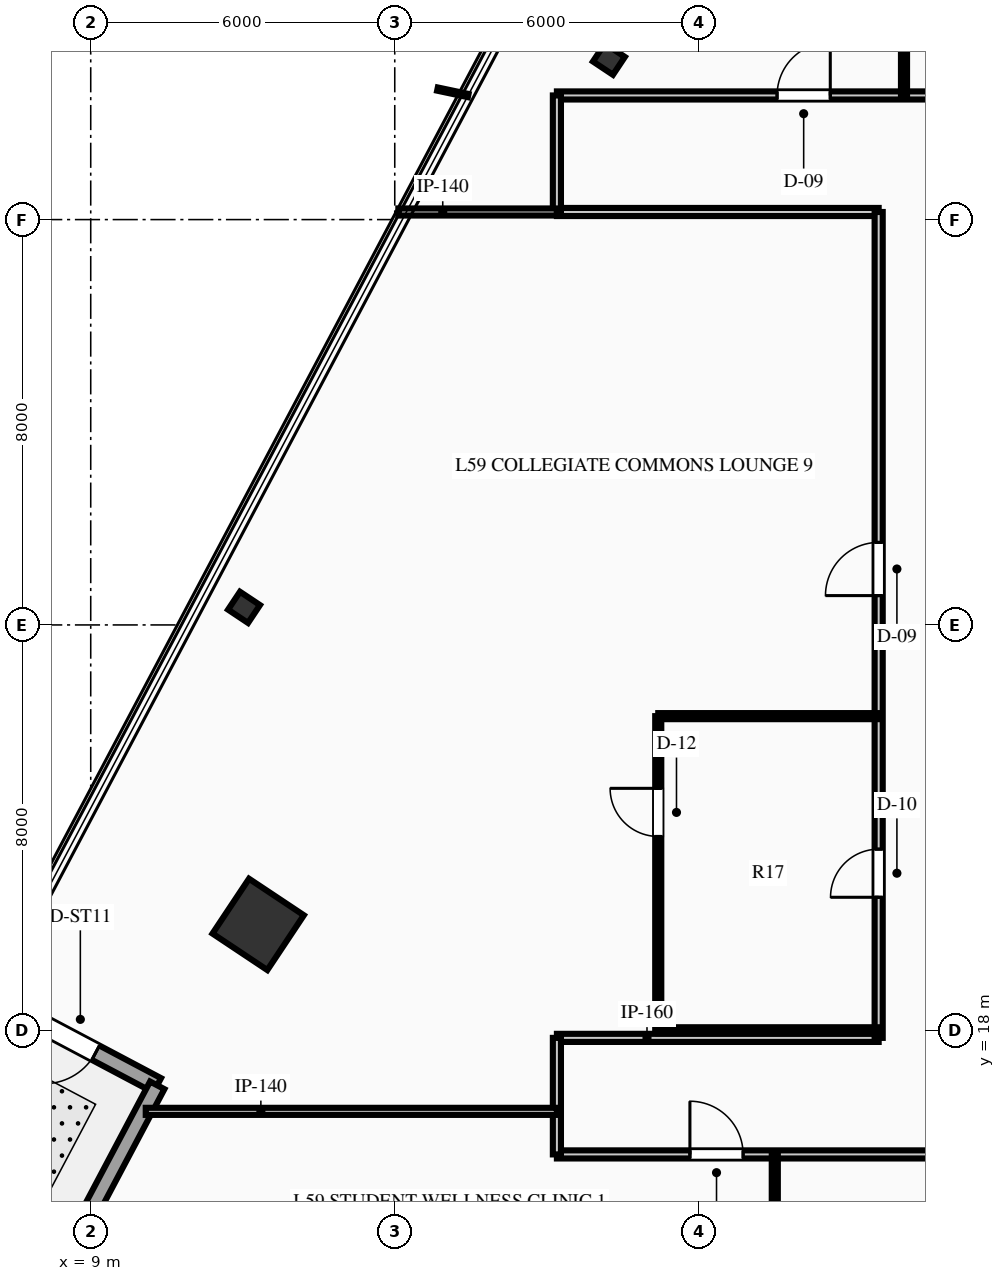
"""IFC4 building model, lengths in metres.
Left out: names, types, materials, properties, quantities, classifications, styles, units other than length and angle.
Written with IfcOpenShell. Run it as: python <this file> out.ifc"""

import sys

from ifc_helpers import new_model, si_unit, direction, frame, frame_2d, origin, origin_2d, place, context, subcontext, project, spatial, rectangle, hollow_rectangle, i_section, extrude, element, fill, save


model = new_model("IFC4")
c1 = context("Model", 3, precision=1e-05, world=origin(), true_north=direction((0.0, 1.0)))
c2 = subcontext(c1, "Body", "Model", "MODEL_VIEW")
j1 = project(units=[si_unit("LENGTHUNIT", "METRE"), si_unit("PLANEANGLEUNIT", "RADIAN")], contexts=[c1])
p1 = place(None, origin())
s1 = spatial("IfcSite", under=j1, at=p1, CompositionType="ELEMENT")
p2 = place(p1, origin())
s2 = spatial("IfcBuilding", under=s1, at=p2, CompositionType="ELEMENT")
p3 = place(p2, frame((0.0, 0.0, 235.95)))
s3 = spatial("IfcBuildingStorey", under=s2, at=p3, CompositionType="ELEMENT", Elevation=235.95)
p4 = place(p3, frame((12.305, 20.09, 0.0), z_axis=(0.0, 0.0, 1.0), x_axis=(0.554118199338, 0.832437998389, 0.0)))
e1 = element("IfcColumn", 1, at=p4, inside=s3, PredefinedType="COLUMN", context=c2, shape_type="SweptSolid", body=[
    extrude(hollow_rectangle(XDim=1.3, YDim=1.3, WallThickness=0.06, at=origin_2d()), origin(), (0.0, 0.0, 1.0), 3.75),
])
for number, where, z_axis, x_axis in (
    (2, (19.226, 37.166, 0.0), (0.0, 0.0, 1.0), (0.554, 0.832, 0.0)),
    (3, (12.025, 26.347, 0.0), (0.0, 0.0, 1.0), (0.554, 0.832, 0.0)),
    (4, (14.088, 14.458, 0.0), (0.0, 0.0, 1.0), (0.554, 0.832, 0.0)),
):
    element("IfcColumn", number, at=place(p3, frame(where, z_axis=z_axis, x_axis=x_axis)), inside=s3, PredefinedType="COLUMN", context=c2, shape_type="SweptSolid", body=[
        extrude(i_section(OverallWidth=0.424, OverallDepth=0.474, WebThickness=0.048, FlangeThickness=0.077, at=origin_2d()), origin(), (0.0, 0.0, 1.0), 3.75),
    ])
p5 = place(p3, frame((10.312, 16.914, 0.0), z_axis=(0.0, 0.0, 1.0), x_axis=(-0.883768120839, 0.467925110021, 0.0)))
e5 = element("IfcWall", 5, at=p5, inside=s3, PredefinedType="STANDARD", context=c2, shape_type="SweptSolid", body=[
    extrude(rectangle(XDim=3.9, YDim=0.32, at=frame_2d((1.95, 0.0))), origin(), (0.0, 0.0, 1.0), 3.4),
])
p6 = place(p5, frame((1.375, 0.0, 0.0)))
e6 = element("IfcOpeningElement", 6, at=p6, cuts=e5, PredefinedType="OPENING", context=c2, shape_type="SweptSolid", body=[
    extrude(rectangle(XDim=1.15, YDim=2.2, at=frame_2d((0.575, 1.1))), frame((0.0, 0.17, 0.0), z_axis=(0.0, -1.0, 0.0), x_axis=(1.0, 0.0, 0.0)), (0.0, 0.0, 1.0), 0.34),
])
p7 = place(p3, frame((8.488, 13.467, 0.0), z_axis=(0.0, 0.0, 1.0), x_axis=(0.467925110021, 0.883768120839, 0.0)))
e7 = element("IfcWall", 7, at=p7, inside=s3, PredefinedType="STANDARD", context=c2, shape_type="SweptSolid", body=[
    extrude(rectangle(XDim=3.9, YDim=0.32, at=frame_2d((1.95, 0.0))), origin(), (0.0, 0.0, 1.0), 3.4),
])
p8 = place(p3, frame((18.2, 15.55, 0.0), z_axis=(0.0, 0.0, 1.0), x_axis=(1.0, 0.0, 0.0)))
e8 = element("IfcWall", 8, at=p8, inside=s3, PredefinedType="PARTITIONING", context=c2, shape_type="SweptSolid", body=[
    extrude(rectangle(XDim=35.6, YDim=0.16, at=frame_2d((17.8, 0.0))), origin(), (0.0, 0.0, 1.0), 2.938),
])
p9 = place(p8, frame((2.625, 0.0, 0.0)))
e9 = element("IfcOpeningElement", 9, at=p9, cuts=e8, PredefinedType="OPENING", context=c2, shape_type="SweptSolid", body=[
    extrude(rectangle(XDim=1.05, YDim=2.15, at=frame_2d((0.525, 1.075))), frame((0.0, 0.09, 0.0), z_axis=(0.0, -1.0, 0.0), x_axis=(1.0, 0.0, 0.0)), (0.0, 0.0, 1.0), 0.18),
])
p10 = place(p8, frame((9.335, 0.0, 0.0)))
e10 = element("IfcOpeningElement", 10, at=p10, cuts=e8, PredefinedType="OPENING", context=c2, shape_type="SweptSolid", body=[
    extrude(rectangle(XDim=1.05, YDim=2.15, at=frame_2d((0.525, 1.075))), frame((0.0, 0.09, 0.0), z_axis=(0.0, -1.0, 0.0), x_axis=(1.0, 0.0, 0.0)), (0.0, 0.0, 1.0), 0.18),
])
p11 = place(p8, frame((17.775, 0.0, 0.0)))
e11 = element("IfcOpeningElement", 11, at=p11, cuts=e8, PredefinedType="OPENING", context=c2, shape_type="SweptSolid", body=[
    extrude(rectangle(XDim=1.05, YDim=2.15, at=frame_2d((0.525, 1.075))), frame((0.0, 0.09, 0.0), z_axis=(0.0, -1.0, 0.0), x_axis=(1.0, 0.0, 0.0)), (0.0, 0.0, 1.0), 0.18),
])
p12 = place(p8, frame((26.055, 0.0, 0.0)))
e12 = element("IfcOpeningElement", 12, at=p12, cuts=e8, PredefinedType="OPENING", context=c2, shape_type="SweptSolid", body=[
    extrude(rectangle(XDim=1.05, YDim=2.15, at=frame_2d((0.525, 1.075))), frame((0.0, 0.09, 0.0), z_axis=(0.0, -1.0, 0.0), x_axis=(1.0, 0.0, 0.0)), (0.0, 0.0, 1.0), 0.18),
])
p13 = place(p8, frame((32.265, 0.0, 0.0)))
e13 = element("IfcOpeningElement", 13, at=p13, cuts=e8, PredefinedType="OPENING", context=c2, shape_type="SweptSolid", body=[
    extrude(rectangle(XDim=1.05, YDim=2.15, at=frame_2d((0.525, 1.075))), frame((0.0, 0.09, 0.0), z_axis=(0.0, -1.0, 0.0), x_axis=(1.0, 0.0, 0.0)), (0.0, 0.0, 1.0), 0.18),
])
p14 = place(p3, frame((18.2, 17.85, 0.0), z_axis=(0.0, 0.0, 1.0), x_axis=(1.0, 0.0, 0.0)))
e14 = element("IfcWall", 14, at=p14, inside=s3, PredefinedType="PARTITIONING", context=c2, shape_type="SweptSolid", body=[
    extrude(rectangle(XDim=6.35, YDim=0.16, at=frame_2d((3.175, 0.0))), origin(), (0.0, 0.0, 1.0), 3.4),
])
p15 = place(p3, frame((18.2, 36.45, 0.0), z_axis=(0.0, 0.0, 1.0), x_axis=(1.0, 0.0, 0.0)))
e15 = element("IfcWall", 15, at=p15, inside=s3, PredefinedType="PARTITIONING", context=c2, shape_type="SweptSolid", body=[
    extrude(rectangle(XDim=35.6, YDim=0.16, at=frame_2d((17.8, 0.0))), origin(), (0.0, 0.0, 1.0), 2.779),
])
p16 = place(p15, frame((7.55, 0.0, 0.0)))
e16 = element("IfcOpeningElement", 16, at=p16, cuts=e15, PredefinedType="OPENING", context=c2, shape_type="SweptSolid", body=[
    extrude(rectangle(XDim=0.9, YDim=2.15, at=frame_2d((0.45, 1.075))), frame((0.0, 0.09, 0.0), z_axis=(0.0, -1.0, 0.0), x_axis=(1.0, 0.0, 0.0)), (0.0, 0.0, 1.0), 0.18),
])
p17 = place(p15, frame((9.85, 0.0, 0.0)))
e17 = element("IfcOpeningElement", 17, at=p17, cuts=e15, PredefinedType="OPENING", context=c2, shape_type="SweptSolid", body=[
    extrude(rectangle(XDim=0.9, YDim=2.15, at=frame_2d((0.45, 1.075))), frame((0.0, 0.09, 0.0), z_axis=(0.0, -1.0, 0.0), x_axis=(1.0, 0.0, 0.0)), (0.0, 0.0, 1.0), 0.18),
])
p18 = place(p15, frame((12.1, 0.0, 0.0)))
e18 = element("IfcOpeningElement", 18, at=p18, cuts=e15, PredefinedType="OPENING", context=c2, shape_type="SweptSolid", body=[
    extrude(rectangle(XDim=1.0, YDim=2.15, at=frame_2d((0.5, 1.075))), frame((0.0, 0.09, 0.0), z_axis=(0.0, -1.0, 0.0), x_axis=(1.0, 0.0, 0.0)), (0.0, 0.0, 1.0), 0.18),
])
p19 = place(p15, frame((4.345, 0.0, 0.0)))
e19 = element("IfcOpeningElement", 19, at=p19, cuts=e15, PredefinedType="OPENING", context=c2, shape_type="SweptSolid", body=[
    extrude(rectangle(XDim=1.05, YDim=2.15, at=frame_2d((0.525, 1.075))), frame((0.0, 0.09, 0.0), z_axis=(0.0, -1.0, 0.0), x_axis=(1.0, 0.0, 0.0)), (0.0, 0.0, 1.0), 0.18),
])
p20 = place(p15, frame((19.035, 0.0, 0.0)))
e20 = element("IfcOpeningElement", 20, at=p20, cuts=e15, PredefinedType="OPENING", context=c2, shape_type="SweptSolid", body=[
    extrude(rectangle(XDim=1.05, YDim=2.15, at=frame_2d((0.525, 1.075))), frame((0.0, 0.09, 0.0), z_axis=(0.0, -1.0, 0.0), x_axis=(1.0, 0.0, 0.0)), (0.0, 0.0, 1.0), 0.18),
])
p21 = place(p15, frame((31.833, 0.0, 0.0)))
e21 = element("IfcOpeningElement", 21, at=p21, cuts=e15, PredefinedType="OPENING", context=c2, shape_type="SweptSolid", body=[
    extrude(rectangle(XDim=1.05, YDim=2.15, at=frame_2d((0.525, 1.075))), frame((0.0, 0.09, 0.0), z_axis=(0.0, -1.0, 0.0), x_axis=(1.0, 0.0, 0.0)), (0.0, 0.0, 1.0), 0.18),
])
p22 = place(p3, frame((18.2, 34.15, 0.0), z_axis=(0.0, 0.0, 1.0), x_axis=(1.0, 0.0, 0.0)))
e22 = element("IfcWall", 22, at=p22, inside=s3, PredefinedType="PARTITIONING", context=c2, shape_type="SweptSolid", body=[
    extrude(rectangle(XDim=6.35, YDim=0.16, at=frame_2d((3.175, 0.0))), origin(), (0.0, 0.0, 1.0), 3.4),
])
p23 = place(p3, frame((24.55, 17.85, 0.0), z_axis=(0.0, 0.0, 1.0), x_axis=(0.0, 1.0, 0.0)))
e23 = element("IfcWall", 23, at=p23, inside=s3, PredefinedType="PARTITIONING", context=c2, shape_type="SweptSolid", body=[
    extrude(rectangle(XDim=16.3, YDim=0.16, at=frame_2d((8.15, 0.0))), origin(), (0.0, 0.0, 1.0), 3.4),
])
p24 = place(p23, frame((2.775, 0.0, 0.0)))
e24 = element("IfcOpeningElement", 24, at=p24, cuts=e23, PredefinedType="OPENING", context=c2, shape_type="SweptSolid", body=[
    extrude(rectangle(XDim=0.95, YDim=2.15, at=frame_2d((0.475, 1.075))), frame((0.0, 0.09, 0.0), z_axis=(0.0, -1.0, 0.0), x_axis=(1.0, 0.0, 0.0)), (0.0, 0.0, 1.0), 0.18),
])
p25 = place(p23, frame((8.729, 0.0, 0.0)))
e25 = element("IfcOpeningElement", 25, at=p25, cuts=e23, PredefinedType="OPENING", context=c2, shape_type="SweptSolid", body=[
    extrude(rectangle(XDim=1.05, YDim=2.15, at=frame_2d((0.525, 1.075))), frame((0.0, 0.09, 0.0), z_axis=(0.0, -1.0, 0.0), x_axis=(1.0, 0.0, 0.0)), (0.0, 0.0, 1.0), 0.18),
])
for number, where, z_axis, x_axis in (
    (26, (18.2, 15.55, 0.0), (0.0, 0.0, 1.0), (0.0, 1.0, 0.0)),
    (27, (18.2, 34.15, 0.0), (0.0, 0.0, 1.0), (0.0, 1.0, 0.0)),
):
    element("IfcWall", number, at=place(p3, frame(where, z_axis=z_axis, x_axis=x_axis)), inside=s3, PredefinedType="PARTITIONING", context=c2, shape_type="SweptSolid", body=[
        extrude(rectangle(XDim=2.3, YDim=0.16, at=frame_2d((1.15, 0.0))), origin(), (0.0, 0.0, 1.0), 3.4),
    ])
p26 = place(p3, frame((25.05, 36.45, 0.0), z_axis=(0.0, 0.0, 1.0), x_axis=(0.0, 1.0, 0.0)))
e28 = element("IfcWall", 28, at=p26, inside=s3, PredefinedType="PARTITIONING", context=c2, shape_type="SweptSolid", body=[
    extrude(rectangle(XDim=3.9, YDim=0.12, at=frame_2d((1.95, 0.0))), origin(), (0.0, 0.0, 1.0), 3.4),
])
p27 = place(p3, frame((10.086, 16.4, 0.0), z_axis=(0.0, 0.0, 1.0), x_axis=(1.0, 0.0, 0.0)))
e29 = element("IfcWall", 29, at=p27, inside=s3, PredefinedType="PARTITIONING", context=c2, shape_type="SweptSolid", body=[
    extrude(rectangle(XDim=8.114, YDim=0.14, at=frame_2d((4.057, 0.0))), origin(), (0.0, 0.0, 1.0), 3.4),
])
p28 = place(p3, frame((15.071, 34.15, 0.0), z_axis=(0.0, 0.0, 1.0), x_axis=(1.0, 0.0, 0.0)))
e30 = element("IfcWall", 30, at=p28, inside=s3, PredefinedType="PARTITIONING", context=c2, shape_type="SweptSolid", body=[
    extrude(rectangle(XDim=3.129, YDim=0.14, at=frame_2d((1.564, 0.0))), origin(), (0.0, 0.0, 1.0), 3.4),
])
p29 = place(p3, frame((22.5, 6.093, 0.0), z_axis=(0.0, 0.0, 1.0), x_axis=(0.0, 1.0, 0.0)))
e31 = element("IfcWall", 31, at=p29, inside=s3, PredefinedType="PARTITIONING", context=c2, shape_type="SweptSolid", body=[
    extrude(rectangle(XDim=9.457, YDim=0.12, at=frame_2d((4.729, 0.0))), origin(), (0.0, 0.0, 1.0), 3.4),
])
p30 = place(p3, frame((20.2, 18.0, 0.0), z_axis=(0.0, 0.0, 1.0), x_axis=(1.0, 0.0, 0.0)))
e32 = element("IfcWall", 32, at=p30, inside=s3, PredefinedType="PARTITIONING", context=c2, shape_type="SweptSolid", body=[
    extrude(rectangle(XDim=4.35, YDim=0.12, at=frame_2d((2.175, 0.0))), origin(), (0.0, 0.0, 1.0), 3.4),
])
p31 = place(p3, frame((20.2, 18.0, 0.0), z_axis=(0.0, 0.0, 1.0), x_axis=(0.0, 1.0, 0.0)))
e33 = element("IfcWall", 33, at=p31, inside=s3, PredefinedType="PARTITIONING", context=c2, shape_type="SweptSolid", body=[
    extrude(rectangle(XDim=6.2, YDim=0.12, at=frame_2d((3.1, 0.0))), origin(), (0.0, 0.0, 1.0), 3.4),
])
p32 = place(p31, frame((3.825, 0.0, 0.0)))
e34 = element("IfcOpeningElement", 34, at=p32, cuts=e33, PredefinedType="OPENING", context=c2, shape_type="SweptSolid", body=[
    extrude(rectangle(XDim=0.95, YDim=2.15, at=frame_2d((0.475, 1.075))), frame((0.0, 0.07, 0.0), z_axis=(0.0, -1.0, 0.0), x_axis=(1.0, 0.0, 0.0)), (0.0, 0.0, 1.0), 0.14),
])
p33 = place(p3, frame((20.2, 24.2, 0.0), z_axis=(0.0, 0.0, 1.0), x_axis=(1.0, 0.0, 0.0)))
e35 = element("IfcWall", 35, at=p33, inside=s3, PredefinedType="PARTITIONING", context=c2, shape_type="SweptSolid", body=[
    extrude(rectangle(XDim=4.35, YDim=0.12, at=frame_2d((2.175, 0.0))), origin(), (0.0, 0.0, 1.0), 3.4),
])
p34 = place(p6, origin())
e36 = element("IfcDoor", 36, at=p34, inside=s3, OperationType="SINGLE_SWING_RIGHT", PredefinedType="DOOR", context=c2, shape_type="SweptSolid", body=[
    extrude(rectangle(XDim=1.15, YDim=2.2, at=frame_2d((0.575, 1.1))), frame((0.0, 0.025, 0.0), z_axis=(0.0, -1.0, 0.0), x_axis=(1.0, 0.0, 0.0)), (0.0, 0.0, 1.0), 0.05),
])
fill(e6, e36)
p35 = place(p24, origin())
e37 = element("IfcDoor", 37, at=p35, inside=s3, OperationType="SINGLE_SWING_LEFT", PredefinedType="DOOR", context=c2, shape_type="SweptSolid", body=[
    extrude(rectangle(XDim=0.95, YDim=2.15, at=frame_2d((0.475, 1.075))), frame((0.0, 0.025, 0.0), z_axis=(0.0, -1.0, 0.0), x_axis=(1.0, 0.0, 0.0)), (0.0, 0.0, 1.0), 0.05),
])
fill(e24, e37)
p36 = place(p32, origin())
e38 = element("IfcDoor", 38, at=p36, inside=s3, OperationType="SINGLE_SWING_RIGHT", PredefinedType="DOOR", context=c2, shape_type="SweptSolid", body=[
    extrude(rectangle(XDim=0.95, YDim=2.15, at=frame_2d((0.475, 1.075))), frame((0.0, 0.025, 0.0), z_axis=(0.0, -1.0, 0.0), x_axis=(1.0, 0.0, 0.0)), (0.0, 0.0, 1.0), 0.05),
])
fill(e34, e38)
p37 = place(p9, origin())
e39 = element("IfcDoor", 39, at=p37, inside=s3, OperationType="SINGLE_SWING_LEFT", PredefinedType="DOOR", context=c2, shape_type="SweptSolid", body=[
    extrude(rectangle(XDim=1.05, YDim=2.15, at=frame_2d((0.525, 1.075))), frame((0.0, 0.025, 0.0), z_axis=(0.0, -1.0, 0.0), x_axis=(1.0, 0.0, 0.0)), (0.0, 0.0, 1.0), 0.05),
])
fill(e9, e39)
p38 = place(p19, origin())
e40 = element("IfcDoor", 40, at=p38, inside=s3, OperationType="SINGLE_SWING_RIGHT", PredefinedType="DOOR", context=c2, shape_type="SweptSolid", body=[
    extrude(rectangle(XDim=1.05, YDim=2.15, at=frame_2d((0.525, 1.075))), frame((0.0, 0.025, 0.0), z_axis=(0.0, -1.0, 0.0), x_axis=(1.0, 0.0, 0.0)), (0.0, 0.0, 1.0), 0.05),
])
fill(e19, e40)
p39 = place(p25, origin())
e41 = element("IfcDoor", 41, at=p39, inside=s3, OperationType="SINGLE_SWING_LEFT", PredefinedType="DOOR", context=c2, shape_type="SweptSolid", body=[
    extrude(rectangle(XDim=1.05, YDim=2.15, at=frame_2d((0.525, 1.075))), frame((0.0, 0.025, 0.0), z_axis=(0.0, -1.0, 0.0), x_axis=(1.0, 0.0, 0.0)), (0.0, 0.0, 1.0), 0.05),
])
fill(e25, e41)
save(model, sys.argv[1])
